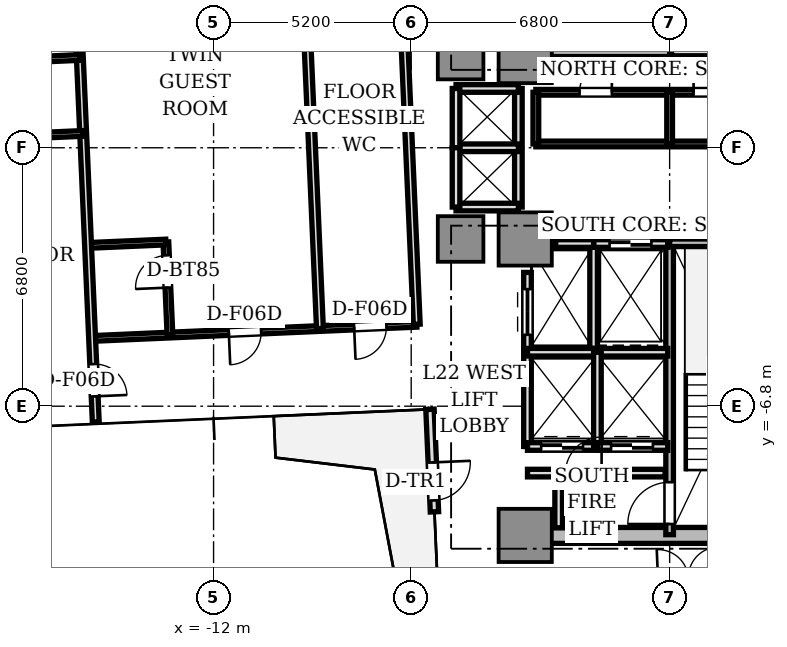
"""IFC4 building model, lengths in metres.
Left out: names, types, materials, properties, quantities, classifications, styles, units other than length and angle.
Written with IfcOpenShell. Run it as: python <this file> out.ifc"""

import sys

from ifc_helpers import new_model, si_unit, direction, frame, frame_2d, origin, origin_2d, place, context, subcontext, project, spatial, rectangle, extrude, source, transform, mapped, element, fill, save


model = new_model("IFC4")
c1 = context("Model", 3, precision=1e-05, world=origin(), true_north=direction((0.0, 1.0)))
c2 = subcontext(c1, "Body", "Model", "MODEL_VIEW")
j1 = project(units=[si_unit("LENGTHUNIT", "METRE"), si_unit("PLANEANGLEUNIT", "RADIAN")], contexts=[c1])
p1 = place(None, origin())
s1 = spatial("IfcSite", under=j1, at=p1, CompositionType="ELEMENT")
p2 = place(p1, origin())
s2 = spatial("IfcBuilding", under=s1, at=p2, CompositionType="ELEMENT")
p3 = place(p2, frame((0.0, 0.0, 83.5)))
s3 = spatial("IfcBuildingStorey", under=s2, at=p3, CompositionType="ELEMENT", Elevation=83.5)
p4 = place(p3, frame((-3.55, -10.2, 0.0), z_axis=(0.0, 0.0, 1.0), x_axis=(1.0, 0.0, 0.0)))
e1 = element("IfcWall", 1, at=p4, inside=s3, PredefinedType="SHEAR", context=c2, shape_type="SweptSolid", body=[
    extrude(rectangle(XDim=7.1, YDim=0.42, at=frame_2d((3.55, 0.0))), origin(), (0.0, 0.0, 1.0), 3.11),
])
m1 = source(origin(), c2, "Body", "SweptSolid", [
    extrude(rectangle(XDim=1.4, YDim=1.4, at=origin_2d()), origin(), (0.0, 0.0, 1.0), 3.11),
])
for number, where, z_axis, x_axis in (
    (2, (-3.8, 2.4, 0.0), (0.0, 0.0, 1.0), (1.0, 0.0, 0.0)),
    (3, (-3.8, -2.4, 0.0), (0.0, 0.0, 1.0), (1.0, 0.0, 0.0)),
    (4, (-3.8, -10.2, 0.0), (0.0, 0.0, 1.0), (1.0, 0.0, 0.0)),
):
    element("IfcColumn", number, at=place(p3, frame(where, z_axis=z_axis, x_axis=x_axis)), inside=s3, PredefinedType="COLUMN", context=c2, shape_type="MappedRepresentation", body=[
        mapped(m1, transform((0.0, 0.0, 0.0), scale=1.0)),
    ])
m2 = source(origin(), c2, "Body", "SweptSolid", [
    extrude(rectangle(XDim=1.2, YDim=1.2, at=origin_2d()), origin(), (0.0, 0.0, 1.0), 3.11),
])
for number, where, z_axis, x_axis in (
    (5, (-5.5, 2.4, 0.0), (0.0, 0.0, 1.0), (1.0, 0.0, 0.0)),
    (6, (-5.5, -2.4, 0.0), (0.0, 0.0, 1.0), (1.0, 0.0, 0.0)),
):
    element("IfcColumn", number, at=place(p3, frame(where, z_axis=z_axis, x_axis=x_axis)), inside=s3, PredefinedType="COLUMN", context=c2, shape_type="MappedRepresentation", body=[
        mapped(m2, transform((0.0, 0.0, 0.0), scale=1.0)),
    ])
p5 = place(p3, frame((-6.306, -6.882, 0.0), z_axis=(0.0, 0.0, 1.0), x_axis=(0.043672655174, -0.999045894436, 0.0)))
e7 = element("IfcWall", 7, at=p5, inside=s3, PredefinedType="STANDARD", context=c2, shape_type="SweptSolid", body=[
    extrude(rectangle(XDim=2.7, YDim=0.22, at=frame_2d((1.35, 0.0))), origin(), (0.0, 0.0, 1.0), 3.11),
])
p6 = place(p5, frame((1.4, 0.0, 0.0)))
e8 = element("IfcOpeningElement", 8, at=p6, cuts=e7, PredefinedType="OPENING", context=c2, shape_type="SweptSolid", body=[
    extrude(rectangle(XDim=1.0, YDim=2.2, at=frame_2d((0.5, 1.1))), frame((0.0, 0.12, 0.0), z_axis=(0.0, -1.0, 0.0), x_axis=(1.0, 0.0, 0.0)), (0.0, 0.0, 1.0), 0.24),
])
p7 = place(p3, frame((0.0, 2.5, 0.0), z_axis=(0.0, 0.0, 1.0), x_axis=(0.0, 1.0, 0.0)))
e9 = element("IfcWall", 9, at=p7, inside=s3, PredefinedType="SOLIDWALL", context=c2, shape_type="SweptSolid", body=[
    extrude(rectangle(XDim=7.68, YDim=0.2, at=frame_2d((3.84, 0.0))), origin(), (0.0, 0.0, 1.0), 3.11),
])
p8 = place(p7, frame((6.36, 0.0, 0.0)))
e10 = element("IfcOpeningElement", 10, at=p8, cuts=e9, PredefinedType="OPENING", context=c2, shape_type="SweptSolid", body=[
    extrude(rectangle(XDim=1.1, YDim=2.15, at=frame_2d((0.55, 1.075))), frame((0.0, 0.11, 0.0), z_axis=(0.0, -1.0, 0.0), x_axis=(1.0, 0.0, 0.0)), (0.0, 0.0, 1.0), 0.22),
])
p9 = place(p3, frame((-3.72, 2.5, 0.0), z_axis=(0.0, 0.0, 1.0), x_axis=(1.0, 0.0, 0.0)))
e11 = element("IfcWall", 11, at=p9, inside=s3, PredefinedType="SOLIDWALL", context=c2, shape_type="SweptSolid", body=[
    extrude(rectangle(XDim=3.72, YDim=0.2, at=frame_2d((1.86, 0.0))), origin(), (0.0, 0.0, 1.0), 3.11),
])
p10 = place(p3, frame((0.0, -10.18, 0.0), z_axis=(0.0, 0.0, 1.0), x_axis=(0.0, 1.0, 0.0)))
e12 = element("IfcWall", 12, at=p10, inside=s3, PredefinedType="SOLIDWALL", context=c2, shape_type="SweptSolid", body=[
    extrude(rectangle(XDim=7.68, YDim=0.2, at=frame_2d((3.84, 0.0))), origin(), (0.0, 0.0, 1.0), 3.11),
])
p11 = place(p10, frame((0.28, 0.0, 0.0)))
e13 = element("IfcOpeningElement", 13, at=p11, cuts=e12, PredefinedType="OPENING", context=c2, shape_type="SweptSolid", body=[
    extrude(rectangle(XDim=1.1, YDim=2.15, at=frame_2d((0.55, 1.075))), frame((0.0, 0.11, 0.0), z_axis=(0.0, -1.0, 0.0), x_axis=(1.0, 0.0, 0.0)), (0.0, 0.0, 1.0), 0.22),
])
p12 = place(p3, frame((0.0, -2.5, 0.0), z_axis=(0.0, 0.0, 1.0), x_axis=(1.0, 0.0, 0.0)))
e14 = element("IfcWall", 14, at=p12, inside=s3, PredefinedType="SOLIDWALL", context=c2, shape_type="SweptSolid", body=[
    extrude(rectangle(XDim=3.72, YDim=0.2, at=frame_2d((1.86, 0.0))), origin(), (0.0, 0.0, 1.0), 3.11),
])
p13 = place(p3, frame((0.05, 2.52, 0.0), z_axis=(0.0, 0.0, 1.0), x_axis=(1.0, 0.0, 0.0)))
e15 = element("IfcWall", 15, at=p13, inside=s3, PredefinedType="SOLIDWALL", context=c2, shape_type="SweptSolid", body=[
    extrude(rectangle(XDim=1.95, YDim=0.2, at=frame_2d((0.975, 0.0))), origin(), (0.0, 0.0, 1.0), 2.66),
])
p14 = place(p3, frame((-2.0, -5.28, 0.0), z_axis=(0.0, 0.0, 1.0), x_axis=(0.0, 1.0, 0.0)))
e16 = element("IfcWall", 16, at=p14, inside=s3, PredefinedType="SOLIDWALL", context=c2, shape_type="SweptSolid", body=[
    extrude(rectangle(XDim=2.78, YDim=0.2, at=frame_2d((1.39, 0.0))), origin(), (0.0, 0.0, 1.0), 2.66),
])
p15 = place(p3, frame((-2.0, -2.52, 0.0), z_axis=(0.0, 0.0, 1.0), x_axis=(1.0, 0.0, 0.0)))
e17 = element("IfcWall", 17, at=p15, inside=s3, PredefinedType="SOLIDWALL", context=c2, shape_type="SweptSolid", body=[
    extrude(rectangle(XDim=1.95, YDim=0.2, at=frame_2d((0.975, 0.0))), origin(), (0.0, 0.0, 1.0), 2.66),
])
p16 = place(p15, frame((0.42, 0.0, 0.0)))
e18 = element("IfcOpeningElement", 18, at=p16, cuts=e17, PredefinedType="OPENING", context=c2, shape_type="SweptSolid", body=[
    extrude(rectangle(XDim=1.1, YDim=2.2, at=frame_2d((0.55, 1.1))), frame((0.0, 0.11, 0.0), z_axis=(0.0, -1.0, 0.0), x_axis=(1.0, 0.0, 0.0)), (0.0, 0.0, 1.0), 0.22),
])
p17 = place(p3, frame((-3.0, -2.52, 0.0), z_axis=(0.0, 0.0, 1.0), x_axis=(1.0, 0.0, 0.0)))
e19 = element("IfcWall", 19, at=p17, inside=s3, PredefinedType="SOLIDWALL", context=c2, shape_type="SweptSolid", body=[
    extrude(rectangle(XDim=1.0, YDim=0.2, at=frame_2d((0.5, 0.0))), origin(), (0.0, 0.0, 1.0), 2.66),
])
p18 = place(p3, frame((-3.74, -5.36, 0.0), z_axis=(0.0, 0.0, 1.0), x_axis=(0.0, 1.0, 0.0)))
e20 = element("IfcWall", 20, at=p18, inside=s3, PredefinedType="SOLIDWALL", context=c2, shape_type="SweptSolid", body=[
    extrude(rectangle(XDim=2.08, YDim=0.2, at=frame_2d((1.04, 0.0))), origin(), (0.0, 0.0, 1.0), 2.66),
])
p19 = place(p18, frame((0.44, 0.0, 0.0)))
e21 = element("IfcOpeningElement", 21, at=p19, cuts=e20, PredefinedType="OPENING", context=c2, shape_type="SweptSolid", body=[
    extrude(rectangle(XDim=1.2, YDim=2.2, at=frame_2d((0.6, 1.1))), frame((0.0, 0.11, 0.0), z_axis=(0.0, -1.0, 0.0), x_axis=(1.0, 0.0, 0.0)), (0.0, 0.0, 1.0), 0.22),
])
p20 = place(p3, frame((-3.74, -7.86, 0.0), z_axis=(0.0, 0.0, 1.0), x_axis=(0.0, 1.0, 0.0)))
e22 = element("IfcWall", 22, at=p20, inside=s3, PredefinedType="SOLIDWALL", context=c2, shape_type="SweptSolid", body=[
    extrude(rectangle(XDim=2.48, YDim=0.2, at=frame_2d((1.24, 0.0))), origin(), (0.0, 0.0, 1.0), 2.66),
])
p21 = place(p3, frame((-3.74, -7.86, 0.0), z_axis=(0.0, 0.0, 1.0), x_axis=(1.0, 0.0, 0.0)))
e23 = element("IfcWall", 23, at=p21, inside=s3, PredefinedType="SOLIDWALL", context=c2, shape_type="SweptSolid", body=[
    extrude(rectangle(XDim=1.84, YDim=0.2, at=frame_2d((0.92, 0.0))), origin(), (0.0, 0.0, 1.0), 2.66),
])
p22 = place(p21, frame((0.36, 0.0, 0.0)))
e24 = element("IfcOpeningElement", 24, at=p22, cuts=e23, PredefinedType="OPENING", context=c2, shape_type="SweptSolid", body=[
    extrude(rectangle(XDim=1.1, YDim=2.2, at=frame_2d((0.55, 1.1))), frame((0.0, 0.11, 0.0), z_axis=(0.0, -1.0, 0.0), x_axis=(1.0, 0.0, 0.0)), (0.0, 0.0, 1.0), 0.22),
])
p23 = place(p3, frame((-3.74, -5.38, 0.0), z_axis=(0.0, 0.0, 1.0), x_axis=(1.0, 0.0, 0.0)))
e25 = element("IfcWall", 25, at=p23, inside=s3, PredefinedType="SOLIDWALL", context=c2, shape_type="SweptSolid", body=[
    extrude(rectangle(XDim=3.69, YDim=0.2, at=frame_2d((1.845, 0.0))), origin(), (0.0, 0.0, 1.0), 2.66),
])
p24 = place(p3, frame((-1.9, -7.86, 0.0), z_axis=(0.0, 0.0, 1.0), x_axis=(0.0, 1.0, 0.0)))
e26 = element("IfcWall", 26, at=p24, inside=s3, PredefinedType="SOLIDWALL", context=c2, shape_type="SweptSolid", body=[
    extrude(rectangle(XDim=2.48, YDim=0.2, at=frame_2d((1.24, 0.0))), origin(), (0.0, 0.0, 1.0), 2.66),
])
p25 = place(p3, frame((-1.9, -7.86, 0.0), z_axis=(0.0, 0.0, 1.0), x_axis=(1.0, 0.0, 0.0)))
e27 = element("IfcWall", 27, at=p25, inside=s3, PredefinedType="SOLIDWALL", context=c2, shape_type="SweptSolid", body=[
    extrude(rectangle(XDim=1.85, YDim=0.2, at=frame_2d((0.925, 0.0))), origin(), (0.0, 0.0, 1.0), 2.66),
])
p26 = place(p25, frame((0.36, 0.0, 0.0)))
e28 = element("IfcOpeningElement", 28, at=p26, cuts=e27, PredefinedType="OPENING", context=c2, shape_type="SweptSolid", body=[
    extrude(rectangle(XDim=1.1, YDim=2.2, at=frame_2d((0.55, 1.1))), frame((0.0, 0.11, 0.0), z_axis=(0.0, -1.0, 0.0), x_axis=(1.0, 0.0, 0.0)), (0.0, 0.0, 1.0), 0.22),
])
p27 = place(p3, frame((-3.98, -1.56, 0.0), z_axis=(0.0, 0.0, 1.0), x_axis=(0.0, 1.0, 0.0)))
e29 = element("IfcWall", 29, at=p27, inside=s3, PredefinedType="SOLIDWALL", context=c2, shape_type="SweptSolid", body=[
    extrude(rectangle(XDim=3.12, YDim=0.2, at=frame_2d((1.56, 0.0))), origin(), (0.0, 0.0, 1.0), 2.28),
])
for number, where, z_axis, x_axis in (
    (30, (-5.62, 1.56, 0.0), (0.0, 0.0, 1.0), (1.0, 0.0, 0.0)),
    (31, (-5.62, -1.56, 0.0), (0.0, 0.0, 1.0), (1.0, 0.0, 0.0)),
    (32, (-5.62, 0.0, 0.0), (0.0, 0.0, 1.0), (1.0, 0.0, 0.0)),
):
    element("IfcWall", number, at=place(p3, frame(where, z_axis=z_axis, x_axis=x_axis)), inside=s3, PredefinedType="SOLIDWALL", context=c2, shape_type="SweptSolid", body=[
        extrude(rectangle(XDim=1.64, YDim=0.2, at=frame_2d((0.82, 0.0))), origin(), (0.0, 0.0, 1.0), 2.66),
    ])
for number, where, z_axis, x_axis in (
    (33, (-5.62, 0.0, 0.0), (0.0, 0.0, 1.0), (0.0, 1.0, 0.0)),
    (34, (-5.62, -1.56, 0.0), (0.0, 0.0, 1.0), (0.0, 1.0, 0.0)),
):
    element("IfcWall", number, at=place(p3, frame(where, z_axis=z_axis, x_axis=x_axis)), inside=s3, PredefinedType="SOLIDWALL", context=c2, shape_type="SweptSolid", body=[
        extrude(rectangle(XDim=1.56, YDim=0.2, at=frame_2d((0.78, 0.0))), origin(), (0.0, 0.0, 1.0), 2.66),
    ])
p28 = place(p3, frame((-3.74, -8.56, 0.0), z_axis=(0.0, 0.0, 1.0), x_axis=(1.0, 0.0, 0.0)))
e35 = element("IfcWall", 35, at=p28, inside=s3, PredefinedType="SOLIDWALL", context=c2, shape_type="SweptSolid", body=[
    extrude(rectangle(XDim=3.62, YDim=0.2, at=frame_2d((1.81, 0.0))), origin(), (0.0, 0.0, 1.0), 2.66),
])
p29 = place(p28, frame((1.0, 0.0, 0.0)))
e36 = element("IfcOpeningElement", 36, at=p29, cuts=e35, PredefinedType="OPENING", context=c2, shape_type="SweptSolid", body=[
    extrude(rectangle(XDim=0.95, YDim=2.15, at=frame_2d((0.475, 1.075))), frame((0.0, 0.11, 0.0), z_axis=(0.0, -1.0, 0.0), x_axis=(1.0, 0.0, 0.0)), (0.0, 0.0, 1.0), 0.22),
])
p30 = place(p3, frame((-2.92, -10.0, 0.0), z_axis=(0.0, 0.0, 1.0), x_axis=(0.0, 1.0, 0.0)))
e37 = element("IfcWall", 37, at=p30, inside=s3, PredefinedType="SOLIDWALL", context=c2, shape_type="SweptSolid", body=[
    extrude(rectangle(XDim=1.44, YDim=0.2, at=frame_2d((0.72, 0.0))), origin(), (0.0, 0.0, 1.0), 2.66),
])
p31 = place(p3, frame((-3.52, 0.1, 0.0), z_axis=(0.0, 0.0, 1.0), x_axis=(1.0, 0.0, 0.0)))
e38 = element("IfcWall", 38, at=p31, inside=s3, PredefinedType="PARTITIONING", context=c2, shape_type="SweptSolid", body=[
    extrude(rectangle(XDim=5.68, YDim=0.15, at=frame_2d((2.84, 0.0))), origin(), (0.0, 0.0, 1.0), 2.66),
])
p32 = place(p3, frame((-3.52, 1.46, 0.0), z_axis=(0.0, 0.0, 1.0), x_axis=(1.0, 0.0, 0.0)))
e39 = element("IfcWall", 39, at=p32, inside=s3, PredefinedType="PARTITIONING", context=c2, shape_type="SweptSolid", body=[
    extrude(rectangle(XDim=5.68, YDim=0.15, at=frame_2d((2.84, 0.0))), origin(), (0.0, 0.0, 1.0), 2.66),
])
p33 = place(p32, frame((1.15, 0.0, 0.0)))
e40 = element("IfcOpeningElement", 40, at=p33, cuts=e39, PredefinedType="OPENING", context=c2, shape_type="SweptSolid", body=[
    extrude(rectangle(XDim=0.85, YDim=2.1, at=frame_2d((0.425, 1.05))), frame((0.0, 0.085, 0.0), z_axis=(0.0, -1.0, 0.0), x_axis=(1.0, 0.0, 0.0)), (0.0, 0.0, 1.0), 0.17),
])
p34 = place(p32, frame((4.15, 0.0, 0.0)))
e41 = element("IfcOpeningElement", 41, at=p34, cuts=e39, PredefinedType="OPENING", context=c2, shape_type="SweptSolid", body=[
    extrude(rectangle(XDim=0.85, YDim=2.1, at=frame_2d((0.425, 1.05))), frame((0.0, 0.085, 0.0), z_axis=(0.0, -1.0, 0.0), x_axis=(1.0, 0.0, 0.0)), (0.0, 0.0, 1.0), 0.17),
])
p35 = place(p3, frame((-3.52, 0.1, 0.0), z_axis=(0.0, 0.0, 1.0), x_axis=(0.0, 1.0, 0.0)))
e42 = element("IfcWall", 42, at=p35, inside=s3, PredefinedType="PARTITIONING", context=c2, shape_type="SweptSolid", body=[
    extrude(rectangle(XDim=1.36, YDim=0.15, at=frame_2d((0.68, 0.0))), origin(), (0.0, 0.0, 1.0), 2.28),
])
p36 = place(p3, frame((0.0, 0.1, 0.0), z_axis=(0.0, 0.0, 1.0), x_axis=(0.0, 1.0, 0.0)))
e43 = element("IfcWall", 43, at=p36, inside=s3, PredefinedType="PARTITIONING", context=c2, shape_type="SweptSolid", body=[
    extrude(rectangle(XDim=1.36, YDim=0.15, at=frame_2d((0.68, 0.0))), origin(), (0.0, 0.0, 1.0), 2.66),
])
p37 = place(p3, frame((-6.654, -4.645, 0.0), z_axis=(0.0, 0.0, 1.0), x_axis=(-0.999048925025, -0.043603272887, 0.0)))
e44 = element("IfcWall", 44, at=p37, inside=s3, PredefinedType="PARTITIONING", context=c2, shape_type="SweptSolid", body=[
    extrude(rectangle(XDim=8.55, YDim=0.15, at=frame_2d((4.275, 0.0))), origin(), (0.0, 0.0, 1.0), 2.63),
])
p38 = place(p37, frame((0.8, 0.0, 0.0)))
e45 = element("IfcOpeningElement", 45, at=p38, cuts=e44, PredefinedType="OPENING", context=c2, shape_type="SweptSolid", body=[
    extrude(rectangle(XDim=0.85, YDim=2.1, at=frame_2d((0.425, 1.05))), frame((0.0, 0.085, 0.0), z_axis=(0.0, -1.0, 0.0), x_axis=(1.0, 0.0, 0.0)), (0.0, 0.0, 1.0), 0.17),
])
p39 = place(p37, frame((4.1, 0.0, 0.0)))
e46 = element("IfcOpeningElement", 46, at=p39, cuts=e44, PredefinedType="OPENING", context=c2, shape_type="SweptSolid", body=[
    extrude(rectangle(XDim=0.85, YDim=2.1, at=frame_2d((0.425, 1.05))), frame((0.0, 0.085, 0.0), z_axis=(0.0, -1.0, 0.0), x_axis=(1.0, 0.0, 0.0)), (0.0, 0.0, 1.0), 0.17),
])
p40 = place(p3, frame((-7.129, 6.245, 0.0), z_axis=(0.0, 0.0, 1.0), x_axis=(0.043608291235, -0.999048705988, 0.0)))
e47 = element("IfcWall", 47, at=p40, inside=s3, PredefinedType="PARTITIONING", context=c2, shape_type="SweptSolid", body=[
    extrude(rectangle(XDim=10.9, YDim=0.18, at=frame_2d((5.45, 0.0))), origin(), (0.0, 0.0, 1.0), 2.66),
])
p41 = place(p3, frame((-9.201, -4.756, 0.0), z_axis=(0.0, 0.0, 1.0), x_axis=(-0.043609267053, 0.999048663393, 0.0)))
e48 = element("IfcWall", 48, at=p41, inside=s3, PredefinedType="PARTITIONING", context=c2, shape_type="SweptSolid", body=[
    extrude(rectangle(XDim=10.9, YDim=0.18, at=frame_2d((5.45, 0.0))), origin(), (0.0, 0.0, 1.0), 2.66),
])
p42 = place(p3, frame((-13.147, -4.928, 0.0), z_axis=(0.0, 0.0, 1.0), x_axis=(-0.043644787072, 0.999047112283, 0.0)))
e49 = element("IfcWall", 49, at=p42, inside=s3, PredefinedType="PARTITIONING", context=c2, shape_type="SweptSolid", body=[
    extrude(rectangle(XDim=2.45, YDim=0.15, at=frame_2d((1.225, 0.0))), origin(), (0.0, 0.0, 1.0), 2.66),
])
p43 = place(p42, frame((1.25, 0.0, 0.0)))
e50 = element("IfcOpeningElement", 50, at=p43, cuts=e49, PredefinedType="OPENING", context=c2, shape_type="SweptSolid", body=[
    extrude(rectangle(XDim=0.85, YDim=2.1, at=frame_2d((0.425, 1.05))), frame((0.0, 0.085, 0.0), z_axis=(0.0, -1.0, 0.0), x_axis=(1.0, 0.0, 0.0)), (0.0, 0.0, 1.0), 0.17),
])
p44 = place(p3, frame((-13.254, -2.48, 0.0), z_axis=(0.0, 0.0, 1.0), x_axis=(-0.999049630844, -0.043587097972, 0.0)))
e51 = element("IfcWall", 51, at=p44, inside=s3, PredefinedType="PARTITIONING", context=c2, shape_type="SweptSolid", body=[
    extrude(rectangle(XDim=2.05, YDim=0.15, at=frame_2d((1.025, 0.0))), origin(), (0.0, 0.0, 1.0), 2.63),
])
p45 = place(p3, frame((-15.671, 5.872, 0.0), z_axis=(0.0, 0.0, 1.0), x_axis=(0.043609488494, -0.999048653727, 0.0)))
e52 = element("IfcWall", 52, at=p45, inside=s3, PredefinedType="PARTITIONING", context=c2, shape_type="SweptSolid", body=[
    extrude(rectangle(XDim=13.1, YDim=0.18, at=frame_2d((6.55, 0.0))), origin(), (0.0, 0.0, 1.0), 2.66),
])
p46 = place(p45, frame((11.575, 0.0, 0.0)))
e53 = element("IfcOpeningElement", 53, at=p46, cuts=e52, PredefinedType="OPENING", context=c2, shape_type="SweptSolid", body=[
    extrude(rectangle(XDim=0.85, YDim=2.1, at=frame_2d((0.425, 1.05))), frame((0.0, 0.1, 0.0), z_axis=(0.0, -1.0, 0.0), x_axis=(1.0, 0.0, 0.0)), (0.0, 0.0, 1.0), 0.2),
])
p47 = place(p3, frame((-15.431, 0.377, 0.0), z_axis=(0.0, 0.0, 1.0), x_axis=(-0.999049630844, -0.043587097972, 0.0)))
e54 = element("IfcWall", 54, at=p47, inside=s3, PredefinedType="PARTITIONING", context=c2, shape_type="SweptSolid", body=[
    extrude(rectangle(XDim=2.05, YDim=0.15, at=frame_2d((1.025, 0.0))), origin(), (0.0, 0.0, 1.0), 2.66),
])
p48 = place(p3, frame((-15.518, 2.375, 0.0), z_axis=(0.0, 0.0, 1.0), x_axis=(-0.999044437927, -0.043705961225, 0.0)))
e55 = element("IfcWall", 55, at=p48, inside=s3, PredefinedType="PARTITIONING", context=c2, shape_type="SweptSolid", body=[
    extrude(rectangle(XDim=2.05, YDim=0.15, at=frame_2d((1.025, 0.0))), origin(), (0.0, 0.0, 1.0), 2.63),
])
p49 = place(p3, frame((-6.049, -11.625, 0.0), z_axis=(0.0, 0.0, 1.0), x_axis=(0.999047806124, 0.043628901879, 0.0)))
e56 = element("IfcWall", 56, at=p49, inside=s3, PredefinedType="PARTITIONING", context=c2, shape_type="SweptSolid", body=[
    extrude(rectangle(XDim=13.1, YDim=0.15, at=frame_2d((6.55, 0.0))), origin(), (0.0, 0.0, 1.0), 2.66),
])
p50 = place(p49, frame((5.75, 0.0, 0.0)))
e57 = element("IfcOpeningElement", 57, at=p50, cuts=e56, PredefinedType="OPENING", context=c2, shape_type="SweptSolid", body=[
    extrude(rectangle(XDim=1.6, YDim=2.25, at=frame_2d((0.8, 1.125))), frame((0.0, 0.085, 0.0), z_axis=(0.0, -1.0, 0.0), x_axis=(1.0, 0.0, 0.0)), (0.0, 0.0, 1.0), 0.17),
])
m3 = source(origin(), c2, "Body", "SweptSolid", [
    extrude(rectangle(XDim=1.0, YDim=0.05, at=origin_2d()), origin(), (0.0, 0.0, 1.0), 2.2),
])
p51 = place(p6, frame((0.5, 0.0, 0.0)))
e58 = element("IfcDoor", 58, at=p51, inside=s3, OperationType="SINGLE_SWING_LEFT", PredefinedType="DOOR", context=c2, shape_type="MappedRepresentation", body=[
    mapped(m3, transform((0.0, 0.0, 0.0), scale=1.0)),
])
fill(e8, e58)
m4 = source(origin(), c2, "Body", "SweptSolid", [
    extrude(rectangle(XDim=1.1, YDim=0.05, at=origin_2d()), origin(), (0.0, 0.0, 1.0), 2.2),
])
p52 = place(p16, frame((0.55, 0.0, 0.0)))
e59 = element("IfcDoor", 59, at=p52, inside=s3, OperationType="DOUBLE_DOOR_SLIDING", PredefinedType="DOOR", context=c2, shape_type="MappedRepresentation", body=[
    mapped(m4, transform((0.0, 0.0, 0.0), scale=1.0)),
])
fill(e18, e59)
m5 = source(origin(), c2, "Body", "SweptSolid", [
    extrude(rectangle(XDim=1.2, YDim=0.05, at=origin_2d()), origin(), (0.0, 0.0, 1.0), 2.2),
])
p53 = place(p19, frame((0.6, 0.0, 0.0)))
e60 = element("IfcDoor", 60, at=p53, inside=s3, OperationType="DOUBLE_DOOR_SLIDING", PredefinedType="DOOR", context=c2, shape_type="MappedRepresentation", body=[
    mapped(m5, transform((0.0, 0.0, 0.0), scale=1.0)),
])
fill(e21, e60)
p54 = place(p22, frame((0.55, 0.0, 0.0)))
e61 = element("IfcDoor", 61, at=p54, inside=s3, OperationType="DOUBLE_DOOR_SLIDING", PredefinedType="DOOR", context=c2, shape_type="MappedRepresentation", body=[
    mapped(m4, transform((0.0, 0.0, 0.0), scale=1.0)),
])
fill(e24, e61)
p55 = place(p26, frame((0.55, 0.0, 0.0)))
e62 = element("IfcDoor", 62, at=p55, inside=s3, OperationType="DOUBLE_DOOR_SLIDING", PredefinedType="DOOR", context=c2, shape_type="MappedRepresentation", body=[
    mapped(m4, transform((0.0, 0.0, 0.0), scale=1.0)),
])
fill(e28, e62)
m6 = source(origin(), c2, "Body", "SweptSolid", [
    extrude(rectangle(XDim=1.1, YDim=0.05, at=origin_2d()), origin(), (0.0, 0.0, 1.0), 2.15),
])
p56 = place(p11, frame((0.55, 0.0, 0.0)))
e63 = element("IfcDoor", 63, at=p56, inside=s3, OperationType="SINGLE_SWING_LEFT", PredefinedType="DOOR", context=c2, shape_type="MappedRepresentation", body=[
    mapped(m6, transform((0.0, 0.0, 0.0), scale=1.0)),
])
fill(e13, e63)
m7 = source(origin(), c2, "Body", "SweptSolid", [
    extrude(rectangle(XDim=0.95, YDim=0.05, at=origin_2d()), origin(), (0.0, 0.0, 1.0), 2.15),
])
p57 = place(p29, frame((0.475, 0.0, 0.0)))
e64 = element("IfcDoor", 64, at=p57, inside=s3, OperationType="SINGLE_SWING_RIGHT", PredefinedType="DOOR", context=c2, shape_type="MappedRepresentation", body=[
    mapped(m7, transform((0.0, 0.0, 0.0), scale=1.0)),
])
fill(e36, e64)
m8 = source(origin(), c2, "Body", "SweptSolid", [
    extrude(rectangle(XDim=0.85, YDim=0.05, at=origin_2d()), origin(), (0.0, 0.0, 1.0), 2.1),
])
p58 = place(p33, frame((0.425, 0.0, 0.0)))
e65 = element("IfcDoor", 65, at=p58, inside=s3, OperationType="SINGLE_SWING_RIGHT", PredefinedType="DOOR", context=c2, shape_type="MappedRepresentation", body=[
    mapped(m8, transform((0.0, 0.0, 0.0), scale=1.0)),
])
fill(e40, e65)
p59 = place(p34, frame((0.425, 0.0, 0.0)))
e66 = element("IfcDoor", 66, at=p59, inside=s3, OperationType="SINGLE_SWING_LEFT", PredefinedType="DOOR", context=c2, shape_type="MappedRepresentation", body=[
    mapped(m8, transform((0.0, 0.0, 0.0), scale=1.0)),
])
fill(e41, e66)
p60 = place(p38, frame((0.425, 0.0, 0.0)))
e67 = element("IfcDoor", 67, at=p60, inside=s3, OperationType="SINGLE_SWING_RIGHT", PredefinedType="DOOR", context=c2, shape_type="MappedRepresentation", body=[
    mapped(m8, transform((0.0, 0.0, 0.0), scale=1.0)),
])
fill(e45, e67)
p61 = place(p43, frame((0.425, 0.0, 0.0)))
e68 = element("IfcDoor", 68, at=p61, inside=s3, OperationType="SINGLE_SWING_LEFT", PredefinedType="DOOR", context=c2, shape_type="MappedRepresentation", body=[
    mapped(m8, transform((0.0, 0.0, 0.0), scale=1.0)),
])
fill(e50, e68)
p62 = place(p39, frame((0.425, 0.0, 0.0)))
e69 = element("IfcDoor", 69, at=p62, inside=s3, OperationType="SINGLE_SWING_RIGHT", PredefinedType="DOOR", context=c2, shape_type="MappedRepresentation", body=[
    mapped(m8, transform((0.0, 0.0, 0.0), scale=1.0)),
])
fill(e46, e69)
p63 = place(p46, frame((0.425, 0.0, 0.0)))
e70 = element("IfcDoor", 70, at=p63, inside=s3, OperationType="SINGLE_SWING_RIGHT", PredefinedType="DOOR", context=c2, shape_type="MappedRepresentation", body=[
    mapped(m8, transform((0.0, 0.0, 0.0), scale=1.0)),
])
fill(e53, e70)
save(model, sys.argv[1])
